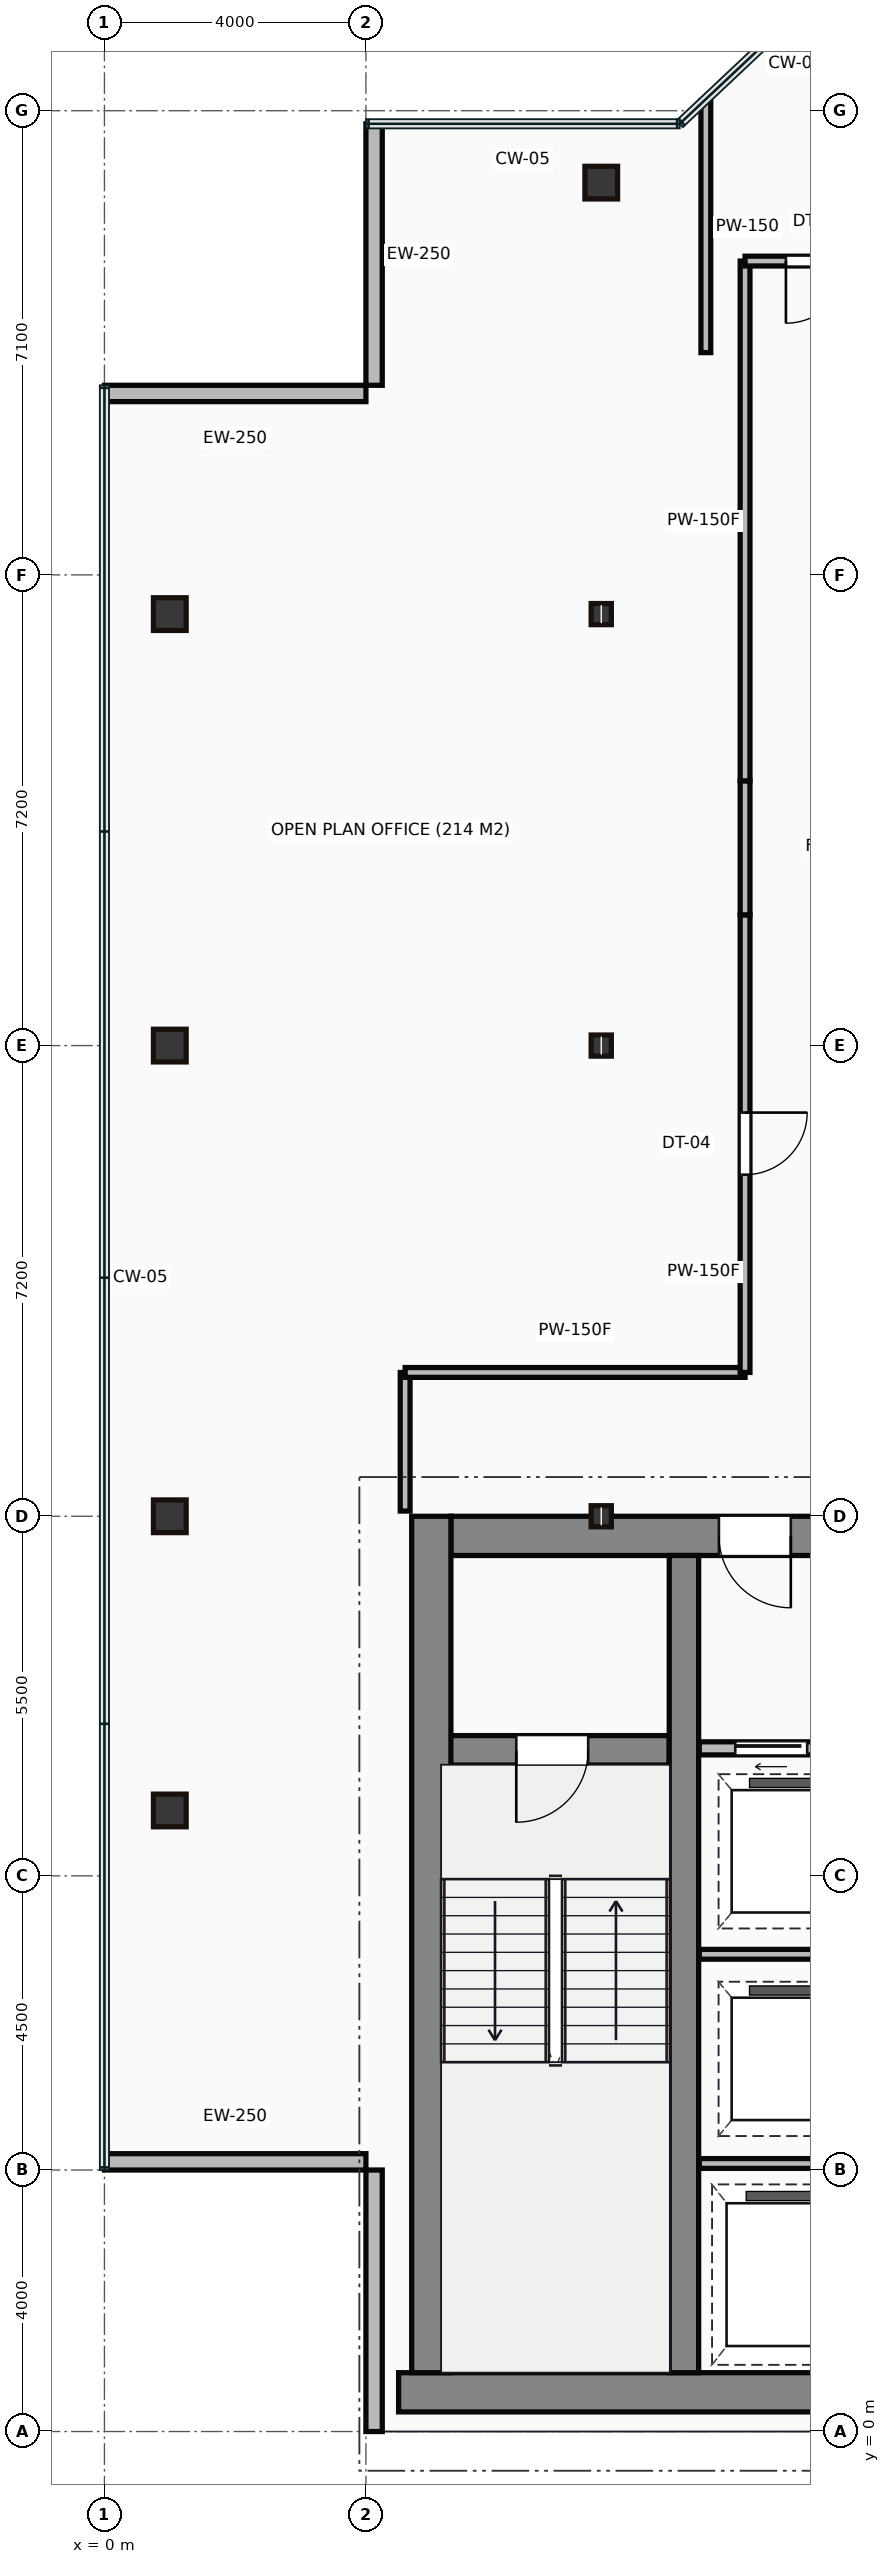
"""IFC4 building model, lengths in metres.
Left out: names, types, materials, properties, quantities, classifications, styles, units other than length and angle.
Written with IfcOpenShell. Run it as: python <this file> out.ifc"""

import sys

from ifc_helpers import new_model, si_unit, direction, frame, frame_2d, origin, origin_2d, place, context, subcontext, project, spatial, rectangle, hollow_rectangle, i_section, extrude, source, transform, mapped, element, fill, save


model = new_model("IFC4")
c1 = context("Model", 3, precision=1e-05, world=origin(), true_north=direction((0.0, 1.0)))
c2 = subcontext(c1, "Body", "Model", "MODEL_VIEW")
j1 = project(units=[si_unit("LENGTHUNIT", "METRE"), si_unit("PLANEANGLEUNIT", "RADIAN")], contexts=[c1])
p1 = place(None, origin())
s1 = spatial("IfcSite", under=j1, at=p1, CompositionType="ELEMENT")
p2 = place(p1, origin())
s2 = spatial("IfcBuilding", under=s1, at=p2, CompositionType="ELEMENT")
p3 = place(p2, frame((0.0, 0.0, 210.5)))
s3 = spatial("IfcBuildingStorey", under=s2, at=p3, CompositionType="ELEMENT", Elevation=210.5)
m1 = source(origin(), c2, "Body", "SweptSolid", [
    extrude(rectangle(XDim=29.5, YDim=0.6, at=frame_2d((14.75, 0.0))), origin(), (0.0, 0.0, 1.0), 3.65),
])
p4 = place(p3, frame((4.5, 0.6, 0.0), z_axis=(0.0, 0.0, 1.0), x_axis=(1.0, 0.0, 0.0)))
e1 = element("IfcWall", 1, at=p4, inside=s3, PredefinedType="SHEAR", context=c2, shape_type="MappedRepresentation", body=[
    mapped(m1, transform((0.0, 0.0, 0.0))),
])
m2 = source(origin(), c2, "Body", "SweptSolid", [
    extrude(rectangle(XDim=13.1, YDim=0.6, at=frame_2d((6.55, 0.0))), origin(), (0.0, 0.0, 1.0), 3.65),
])
p5 = place(p3, frame((5.0, 0.9, 0.0), z_axis=(0.0, 0.0, 1.0), x_axis=(0.0, 1.0, 0.0)))
e2 = element("IfcWall", 2, at=p5, inside=s3, PredefinedType="SHEAR", context=c2, shape_type="MappedRepresentation", body=[
    mapped(m2, transform((0.0, 0.0, 0.0))),
])
m3 = source(origin(), c2, "Body", "SweptSolid", [
    extrude(rectangle(XDim=9.1, YDim=0.6, at=frame_2d((4.55, 0.0))), origin(), (0.0, 0.0, 1.0), 3.65),
])
p6 = place(p3, frame((5.3, 13.7, 0.0), z_axis=(0.0, 0.0, 1.0), x_axis=(1.0, 0.0, 0.0)))
e3 = element("IfcWall", 3, at=p6, inside=s3, PredefinedType="SHEAR", context=c2, shape_type="MappedRepresentation", body=[
    mapped(m3, transform((0.0, 0.0, 0.0))),
])
p7 = place(p6, frame((4.1, 0.0, 0.0)))
e4 = element("IfcOpeningElement", 4, at=p7, cuts=e3, PredefinedType="OPENING", context=c2, shape_type="SweptSolid", body=[
    extrude(rectangle(XDim=1.1, YDim=2.15, at=frame_2d((0.55, 1.075))), frame((0.0, 0.31, 0.0), z_axis=(0.0, -1.0, 0.0), x_axis=(1.0, 0.0, 0.0)), (0.0, 0.0, 1.0), 0.62),
])
m4 = source(origin(), c2, "Body", "SweptSolid", [
    extrude(rectangle(XDim=12.5, YDim=0.45, at=frame_2d((6.25, 0.0))), origin(), (0.0, 0.0, 1.0), 3.65),
])
p8 = place(p3, frame((8.865, 0.9, 0.0), z_axis=(0.0, 0.0, 1.0), x_axis=(0.0, 1.0, 0.0)))
e5 = element("IfcWall", 5, at=p8, inside=s3, PredefinedType="SHEAR", context=c2, shape_type="MappedRepresentation", body=[
    mapped(m4, transform((0.0, 0.0, 0.0))),
])
m5 = source(origin(), c2, "Body", "SweptSolid", [
    extrude(rectangle(XDim=3.39, YDim=0.45, at=frame_2d((1.695, 0.0))), origin(), (0.0, 0.0, 1.0), 3.65),
])
p9 = place(p3, frame((5.25, 10.42, 0.0), z_axis=(0.0, 0.0, 1.0), x_axis=(1.0, 0.0, 0.0)))
e6 = element("IfcWall", 6, at=p9, inside=s3, PredefinedType="SHEAR", context=c2, shape_type="MappedRepresentation", body=[
    mapped(m5, transform((0.0, 0.0, 0.0))),
])
p10 = place(p9, frame((1.05, 0.0, 0.0)))
e7 = element("IfcOpeningElement", 7, at=p10, cuts=e6, PredefinedType="OPENING", context=c2, shape_type="SweptSolid", body=[
    extrude(rectangle(XDim=1.1, YDim=2.15, at=frame_2d((0.55, 1.075))), frame((0.0, 0.235, 0.0), z_axis=(0.0, -1.0, 0.0), x_axis=(1.0, 0.0, 0.0)), (0.0, 0.0, 1.0), 0.47),
])
m6 = source(origin(), c2, "Body", "SweptSolid", [
    extrude(hollow_rectangle(XDim=0.5, YDim=0.5, WallThickness=0.022, at=origin_2d()), origin(), (0.0, 0.0, 1.0), 3.65),
])
for number, where, z_axis, x_axis in (
    (8, (1.0, 9.5, 0.0), (0.0, 0.0, 1.0), (1.0, 0.0, 0.0)),
    (9, (1.0, 14.0, 0.0), (0.0, 0.0, 1.0), (1.0, 0.0, 0.0)),
    (10, (1.0, 21.2, 0.0), (0.0, 0.0, 1.0), (1.0, 0.0, 0.0)),
    (11, (1.0, 27.8, 0.0), (0.0, 0.0, 1.0), (1.0, 0.0, 0.0)),
):
    element("IfcColumn", number, at=place(p3, frame(where, z_axis=z_axis, x_axis=x_axis)), inside=s3, PredefinedType="COLUMN", context=c2, shape_type="MappedRepresentation", body=[
        mapped(m6, transform((0.0, 0.0, 0.0))),
    ])
m7 = source(origin(), c2, "Body", "SweptSolid", [
    extrude(i_section(OverallWidth=0.309, OverallDepth=0.323, WebThickness=0.014, FlangeThickness=0.023, at=origin_2d()), origin(), (0.0, 0.0, 1.0), 3.65),
])
for number, where, z_axis, x_axis in (
    (12, (7.6, 14.0, 0.0), (0.0, 0.0, 1.0), (1.0, 0.0, 0.0)),
    (13, (7.6, 21.2, 0.0), (0.0, 0.0, 1.0), (1.0, 0.0, 0.0)),
    (14, (7.6, 27.8, 0.0), (0.0, 0.0, 1.0), (1.0, 0.0, 0.0)),
):
    element("IfcColumn", number, at=place(p3, frame(where, z_axis=z_axis, x_axis=x_axis)), inside=s3, PredefinedType="COLUMN", context=c2, shape_type="MappedRepresentation", body=[
        mapped(m7, transform((0.0, 0.0, 0.0))),
    ])
p11 = place(p3, frame((7.6, 34.4, 0.0), z_axis=(0.0, 0.0, 1.0), x_axis=(1.0, 0.0, 0.0)))
e15 = element("IfcColumn", 15, at=p11, inside=s3, PredefinedType="COLUMN", context=c2, shape_type="MappedRepresentation", body=[
    mapped(m6, transform((0.0, 0.0, 0.0))),
])
m8 = source(origin(), c2, "Body", "SweptSolid", [
    extrude(rectangle(XDim=4.0, YDim=0.25, at=frame_2d((2.0, 0.0))), origin(), (0.0, 0.0, 1.0), 3.4),
])
for number, where, z_axis, x_axis in (
    (16, (4.125, 35.3, 0.0), (0.0, 0.0, 1.0), (0.0, -1.0, 0.0)),
    (17, (4.0, 31.175, 0.0), (0.0, 0.0, 1.0), (-1.0, 0.0, 0.0)),
    (18, (0.0, 4.125, 0.0), (0.0, 0.0, 1.0), (1.0, 0.0, 0.0)),
    (19, (4.125, 4.0, 0.0), (0.0, 0.0, 1.0), (0.0, -1.0, 0.0)),
):
    element("IfcWall", number, at=place(p3, frame(where, z_axis=z_axis, x_axis=x_axis)), inside=s3, PredefinedType="STANDARD", context=c2, shape_type="MappedRepresentation", body=[
        mapped(m8, transform((0.0, 0.0, 0.0))),
    ])
m9 = source(origin(), c2, "Body", "SweptSolid", [
    extrude(rectangle(XDim=2.35, YDim=0.2, at=frame_2d((1.175, 0.0))), origin(), (0.0, 0.0, 1.0), 3.4),
])
p12 = place(p3, frame((9.1, 10.45, 0.0), z_axis=(0.0, 0.0, 1.0), x_axis=(1.0, 0.0, 0.0)))
e20 = element("IfcWall", 20, at=p12, inside=s3, PredefinedType="PARTITIONING", context=c2, shape_type="MappedRepresentation", body=[
    mapped(m9, transform((0.0, 0.0, 0.0))),
])
p13 = place(p12, frame((0.55, 0.0, 0.0)))
e21 = element("IfcOpeningElement", 21, at=p13, cuts=e20, PredefinedType="OPENING", context=c2, shape_type="SweptSolid", body=[
    extrude(rectangle(XDim=1.1, YDim=2.15, at=frame_2d((0.55, 1.075))), frame((0.0, 0.11, 0.0), z_axis=(0.0, -1.0, 0.0), x_axis=(1.0, 0.0, 0.0)), (0.0, 0.0, 1.0), 0.22),
])
m10 = source(origin(), c2, "Body", "SweptSolid", [
    extrude(rectangle(XDim=2.4, YDim=0.15, at=frame_2d((1.2, 0.0))), origin(), (0.0, 0.0, 1.0), 3.4),
])
for number, where, z_axis, x_axis in (
    (22, (9.1, 4.1, 0.0), (0.0, 0.0, 1.0), (1.0, 0.0, 0.0)),
    (23, (9.1, 7.3, 0.0), (0.0, 0.0, 1.0), (1.0, 0.0, 0.0)),
):
    element("IfcWall", number, at=place(p3, frame(where, z_axis=z_axis, x_axis=x_axis)), inside=s3, PredefinedType="PARTITIONING", context=c2, shape_type="MappedRepresentation", body=[
        mapped(m10, transform((0.0, 0.0, 0.0))),
    ])
m11 = source(origin(), c2, "Body", "SweptSolid", [
    extrude(rectangle(XDim=2.12, YDim=0.15, at=frame_2d((1.06, 0.0))), origin(), (0.0, 0.0, 1.0), 3.4),
])
p14 = place(p3, frame((4.6, 14.08, 0.0), z_axis=(0.0, 0.0, 1.0), x_axis=(0.0, 1.0, 0.0)))
e24 = element("IfcWall", 24, at=p14, inside=s3, PredefinedType="PARTITIONING", context=c2, shape_type="MappedRepresentation", body=[
    mapped(m11, transform((0.0, 0.0, 0.0))),
])
m12 = source(origin(), c2, "Body", "SweptSolid", [
    extrude(rectangle(XDim=5.2, YDim=0.15, at=frame_2d((2.6, 0.0))), origin(), (0.0, 0.0, 1.0), 3.4),
])
p15 = place(p3, frame((4.6, 16.2, 0.0), z_axis=(0.0, 0.0, 1.0), x_axis=(1.0, 0.0, 0.0)))
e25 = element("IfcWall", 25, at=p15, inside=s3, PredefinedType="PARTITIONING", context=c2, shape_type="MappedRepresentation", body=[
    mapped(m12, transform((0.0, 0.0, 0.0))),
])
m13 = source(origin(), c2, "Body", "SweptSolid", [
    extrude(rectangle(XDim=7.0, YDim=0.15, at=frame_2d((3.5, 0.0))), origin(), (0.0, 0.0, 1.0), 3.4),
])
p16 = place(p3, frame((9.8, 16.2, 0.0), z_axis=(0.0, 0.0, 1.0), x_axis=(0.0, 1.0, 0.0)))
e26 = element("IfcWall", 26, at=p16, inside=s3, PredefinedType="PARTITIONING", context=c2, shape_type="MappedRepresentation", body=[
    mapped(m13, transform((0.0, 0.0, 0.0))),
])
p17 = place(p16, frame((3.025, 0.0, 0.0)))
e27 = element("IfcOpeningElement", 27, at=p17, cuts=e26, PredefinedType="OPENING", context=c2, shape_type="SweptSolid", body=[
    extrude(rectangle(XDim=0.95, YDim=2.15, at=frame_2d((0.475, 1.075))), frame((0.0, 0.085, 0.0), z_axis=(0.0, -1.0, 0.0), x_axis=(1.0, 0.0, 0.0)), (0.0, 0.0, 1.0), 0.17),
])
m14 = source(origin(), c2, "Body", "SweptSolid", [
    extrude(rectangle(XDim=2.05, YDim=0.15, at=frame_2d((1.025, 0.0))), origin(), (0.0, 0.0, 1.0), 3.4),
])
p18 = place(p3, frame((9.8, 23.2, 0.0), z_axis=(0.0, 0.0, 1.0), x_axis=(0.0, 1.0, 0.0)))
e28 = element("IfcWall", 28, at=p18, inside=s3, PredefinedType="PARTITIONING", context=c2, shape_type="MappedRepresentation", body=[
    mapped(m14, transform((0.0, 0.0, 0.0))),
])
m15 = source(origin(), c2, "Body", "SweptSolid", [
    extrude(rectangle(XDim=7.95, YDim=0.15, at=frame_2d((3.975, 0.0))), origin(), (0.0, 0.0, 1.0), 3.4),
])
p19 = place(p3, frame((9.8, 25.25, 0.0), z_axis=(0.0, 0.0, 1.0), x_axis=(0.0, 1.0, 0.0)))
e29 = element("IfcWall", 29, at=p19, inside=s3, PredefinedType="PARTITIONING", context=c2, shape_type="MappedRepresentation", body=[
    mapped(m15, transform((0.0, 0.0, 0.0))),
])
m16 = source(origin(), c2, "Body", "SweptSolid", [
    extrude(rectangle(XDim=2.2, YDim=0.15, at=frame_2d((1.1, 0.0))), origin(), (0.0, 0.0, 1.0), 3.4),
])
p20 = place(p3, frame((9.8, 33.2, 0.0), z_axis=(0.0, 0.0, 1.0), x_axis=(1.0, 0.0, 0.0)))
e30 = element("IfcWall", 30, at=p20, inside=s3, PredefinedType="PARTITIONING", context=c2, shape_type="MappedRepresentation", body=[
    mapped(m16, transform((0.0, 0.0, 0.0))),
])
p21 = place(p20, frame((0.625, 0.0, 0.0)))
e31 = element("IfcOpeningElement", 31, at=p21, cuts=e30, PredefinedType="OPENING", context=c2, shape_type="SweptSolid", body=[
    extrude(rectangle(XDim=0.95, YDim=2.15, at=frame_2d((0.475, 1.075))), frame((0.0, 0.085, 0.0), z_axis=(0.0, -1.0, 0.0), x_axis=(1.0, 0.0, 0.0)), (0.0, 0.0, 1.0), 0.17),
])
m17 = source(origin(), c2, "Body", "SweptSolid", [
    extrude(rectangle(XDim=3.849, YDim=0.15, at=frame_2d((1.925, 0.0))), origin(), (0.0, 0.0, 1.0), 3.4),
])
p22 = place(p3, frame((9.2, 35.649, 0.0), z_axis=(0.0, 0.0, 1.0), x_axis=(0.0, -1.0, 0.0)))
e32 = element("IfcWall", 32, at=p22, inside=s3, PredefinedType="PARTITIONING", context=c2, shape_type="MappedRepresentation", body=[
    mapped(m17, transform((0.0, 0.0, 0.0))),
])
m18 = source(origin(), c2, "Body", "SweptSolid", [
    extrude(rectangle(XDim=1.1, YDim=2.15, at=frame_2d((0.55, 1.075))), frame((0.0, 0.025, 0.0), z_axis=(0.0, -1.0, 0.0), x_axis=(1.0, 0.0, 0.0)), (0.0, 0.0, 1.0), 0.05),
])
p23 = place(p10, frame((1.1, 0.0, 0.0), z_axis=(0.0, 0.0, 1.0), x_axis=(-1.0, 0.0, 0.0)))
e33 = element("IfcDoor", 33, at=p23, inside=s3, OperationType="SINGLE_SWING_LEFT", PredefinedType="DOOR", context=c2, shape_type="MappedRepresentation", body=[
    mapped(m18, transform((0.0, 0.0, 0.0))),
])
fill(e7, e33)
p24 = place(p7, origin())
e34 = element("IfcDoor", 34, at=p24, inside=s3, OperationType="SINGLE_SWING_RIGHT", PredefinedType="DOOR", context=c2, shape_type="MappedRepresentation", body=[
    mapped(m18, transform((0.0, 0.0, 0.0))),
])
fill(e4, e34)
p25 = place(p13, origin())
e35 = element("IfcDoor", 35, at=p25, inside=s3, OperationType="SLIDING_TO_LEFT", PredefinedType="DOOR", context=c2, shape_type="MappedRepresentation", body=[
    mapped(m18, transform((0.0, 0.0, 0.0))),
])
fill(e21, e35)
m19 = source(origin(), c2, "Body", "SweptSolid", [
    extrude(rectangle(XDim=0.95, YDim=2.15, at=frame_2d((0.475, 1.075))), frame((0.0, 0.025, 0.0), z_axis=(0.0, -1.0, 0.0), x_axis=(1.0, 0.0, 0.0)), (0.0, 0.0, 1.0), 0.05),
])
p26 = place(p17, origin())
e36 = element("IfcDoor", 36, at=p26, inside=s3, OperationType="SINGLE_SWING_RIGHT", PredefinedType="DOOR", context=c2, shape_type="MappedRepresentation", body=[
    mapped(m19, transform((0.0, 0.0, 0.0))),
])
fill(e27, e36)
p27 = place(p21, origin())
e37 = element("IfcDoor", 37, at=p27, inside=s3, OperationType="SINGLE_SWING_LEFT", PredefinedType="DOOR", context=c2, shape_type="MappedRepresentation", body=[
    mapped(m19, transform((0.0, 0.0, 0.0))),
])
fill(e31, e37)
save(model, sys.argv[1])
